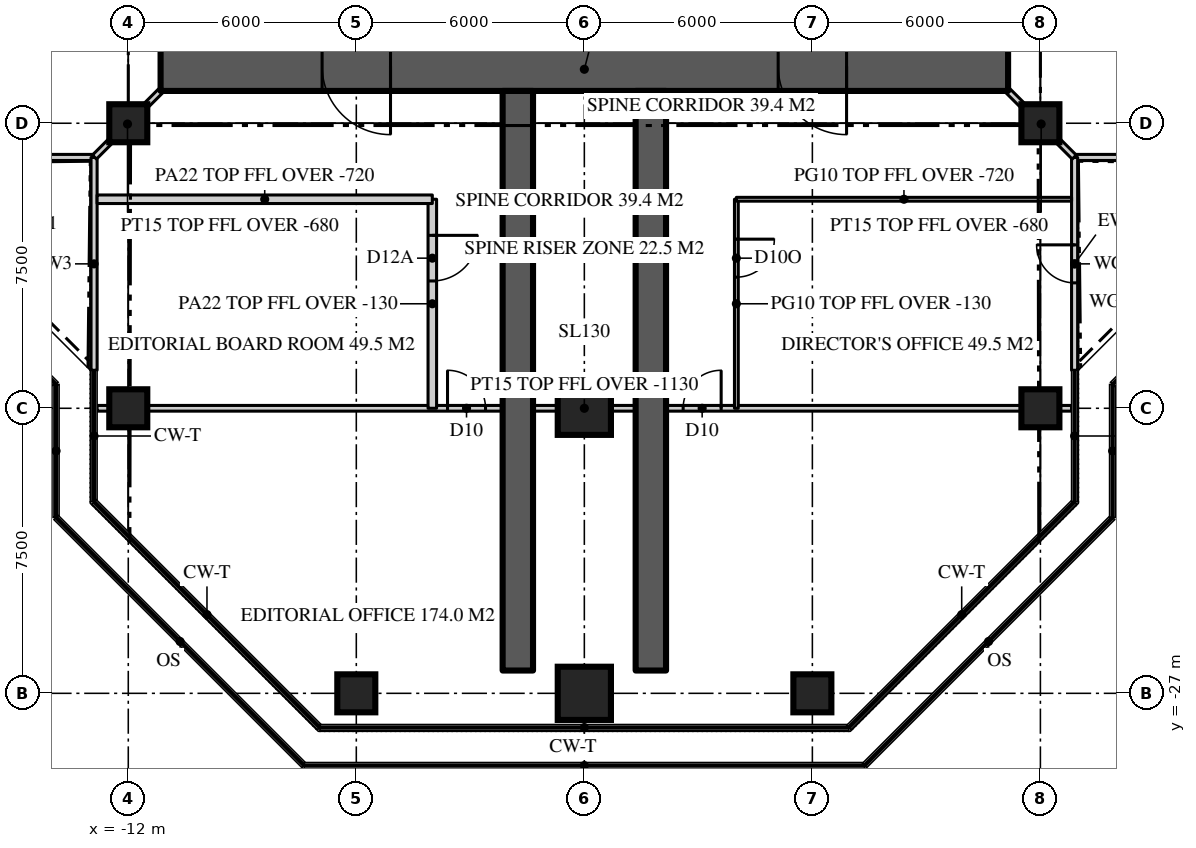
"""IFC4 building model, lengths in metres.
Left out: names, types, materials, properties, quantities, classifications, styles, units other than length and angle.
Written with IfcOpenShell. Run it as: python <this file> out.ifc"""

import sys

from ifc_helpers import new_model, si_unit, direction, frame, frame_2d, origin, origin_2d, place, context, subcontext, project, spatial, rectangle, extrude, element, fill, save


model = new_model("IFC4")
c1 = context("Model", 3, precision=1e-05, world=origin(), true_north=direction((0.0, 1.0)))
c2 = subcontext(c1, "Body", "Model", "MODEL_VIEW")
j1 = project(units=[si_unit("LENGTHUNIT", "METRE"), si_unit("PLANEANGLEUNIT", "RADIAN")], contexts=[c1])
p1 = place(None, origin())
s1 = spatial("IfcSite", under=j1, at=p1, CompositionType="ELEMENT")
p2 = place(p1, origin())
s2 = spatial("IfcBuilding", under=s1, at=p2, CompositionType="ELEMENT")
p3 = place(p2, frame((0.0, 0.0, 286.8)))
s3 = spatial("IfcBuildingStorey", under=s2, at=p3, CompositionType="ELEMENT", Elevation=286.8)
p4 = place(p3, frame((11.15, -10.5, 0.0), z_axis=(0.0, 0.0, 1.0), x_axis=(-1.0, 0.0, 0.0)))
e1 = element("IfcWall", 1, at=p4, inside=s3, PredefinedType="SHEAR", context=c2, shape_type="SweptSolid", body=[
    extrude(rectangle(XDim=22.3, YDim=1.3, at=frame_2d((11.15, 0.0))), origin(), (0.0, 0.0, 1.0), 3.9),
])
p5 = place(p4, frame((16.25, 0.0, 0.0)))
e2 = element("IfcOpeningElement", 2, at=p5, cuts=e1, PredefinedType="OPENING", context=c2, shape_type="SweptSolid", body=[
    extrude(rectangle(XDim=1.8, YDim=2.2, at=frame_2d((0.9, 1.1))), frame((0.0, 0.66, 0.0), z_axis=(0.0, -1.0, 0.0), x_axis=(1.0, 0.0, 0.0)), (0.0, 0.0, 1.0), 1.32),
])
p6 = place(p4, frame((4.25, 0.0, 0.0)))
e3 = element("IfcOpeningElement", 3, at=p6, cuts=e1, PredefinedType="OPENING", context=c2, shape_type="SweptSolid", body=[
    extrude(rectangle(XDim=1.8, YDim=2.2, at=frame_2d((0.9, 1.1))), frame((0.0, 0.66, 0.0), z_axis=(0.0, -1.0, 0.0), x_axis=(1.0, 0.0, 0.0)), (0.0, 0.0, 1.0), 1.32),
])
for number, where, z_axis, x_axis in (
    (4, (-1.75, -11.15, 0.0), (0.0, 0.0, 1.0), (0.0, -1.0, 0.0)),
    (5, (1.75, -11.15, 0.0), (0.0, 0.0, 1.0), (0.0, -1.0, 0.0)),
):
    element("IfcWall", number, at=place(p3, frame(where, z_axis=z_axis, x_axis=x_axis)), inside=s3, PredefinedType="SHEAR", context=c2, shape_type="SweptSolid", body=[
        extrude(rectangle(XDim=15.25, YDim=0.8, at=frame_2d((7.625, 0.0))), origin(), (0.0, 0.0, 1.0), 3.9),
    ])
p7 = place(p3, frame((-6.0, -27.0, 0.0), z_axis=(0.0, 0.0, 1.0), x_axis=(1.0, 0.0, 0.0)))
e6 = element("IfcColumn", 6, at=p7, inside=s3, PredefinedType="COLUMN", context=c2, shape_type="SweptSolid", body=[
    extrude(rectangle(XDim=1.0, YDim=1.0, at=origin_2d()), origin(), (0.0, 0.0, 1.0), 3.9),
])
p8 = place(p3, frame((0.0, -27.0, 0.0), z_axis=(0.0, 0.0, 1.0), x_axis=(1.0, 0.0, 0.0)))
e7 = element("IfcColumn", 7, at=p8, inside=s3, PredefinedType="COLUMN", context=c2, shape_type="SweptSolid", body=[
    extrude(rectangle(XDim=1.4, YDim=1.4, at=origin_2d()), origin(), (0.0, 0.0, 1.0), 3.9),
])
for number, where, z_axis, x_axis in (
    (8, (6.0, -27.0, 0.0), (0.0, 0.0, 1.0), (1.0, 0.0, 0.0)),
    (9, (-12.0, -19.5, 0.0), (0.0, 0.0, 1.0), (1.0, 0.0, 0.0)),
):
    element("IfcColumn", number, at=place(p3, frame(where, z_axis=z_axis, x_axis=x_axis)), inside=s3, PredefinedType="COLUMN", context=c2, shape_type="SweptSolid", body=[
        extrude(rectangle(XDim=1.0, YDim=1.0, at=origin_2d()), origin(), (0.0, 0.0, 1.0), 3.9),
    ])
p9 = place(p3, frame((0.0, -19.5, 0.0), z_axis=(0.0, 0.0, 1.0), x_axis=(1.0, 0.0, 0.0)))
e10 = element("IfcColumn", 10, at=p9, inside=s3, PredefinedType="COLUMN", context=c2, shape_type="SweptSolid", body=[
    extrude(rectangle(XDim=1.4, YDim=1.4, at=origin_2d()), origin(), (0.0, 0.0, 1.0), 3.9),
])
for number, where, z_axis, x_axis in (
    (11, (12.0, -19.5, 0.0), (0.0, 0.0, 1.0), (1.0, 0.0, 0.0)),
    (12, (-12.0, -12.0, 0.0), (0.0, 0.0, 1.0), (1.0, 0.0, 0.0)),
    (13, (12.0, -12.0, 0.0), (0.0, 0.0, 1.0), (1.0, 0.0, 0.0)),
):
    element("IfcColumn", number, at=place(p3, frame(where, z_axis=z_axis, x_axis=x_axis)), inside=s3, PredefinedType="COLUMN", context=c2, shape_type="SweptSolid", body=[
        extrude(rectangle(XDim=1.0, YDim=1.0, at=origin_2d()), origin(), (0.0, 0.0, 1.0), 3.9),
    ])
p10 = place(p3, frame((12.9, -12.9, 0.0), z_axis=(0.0, 0.0, 1.0), x_axis=(1.0, 0.0, 0.0)))
e14 = element("IfcWall", 14, at=p10, inside=s3, PredefinedType="SOLIDWALL", context=c2, shape_type="SweptSolid", body=[
    extrude(rectangle(XDim=5.6, YDim=0.16, at=frame_2d((2.8, 0.0))), origin(), (0.0, 0.0, 1.0), 3.77),
])
p11 = place(p3, frame((-18.5, -12.9, 0.0), z_axis=(0.0, 0.0, 1.0), x_axis=(1.0, 0.0, 0.0)))
e15 = element("IfcWall", 15, at=p11, inside=s3, PredefinedType="SOLIDWALL", context=c2, shape_type="SweptSolid", body=[
    extrude(rectangle(XDim=5.6, YDim=0.16, at=frame_2d((2.8, 0.0))), origin(), (0.0, 0.0, 1.0), 3.77),
])
p12 = place(p11, frame((2.3, 0.0, 0.0)))
e16 = element("IfcOpeningElement", 16, at=p12, cuts=e15, PredefinedType="OPENING", context=c2, shape_type="SweptSolid", body=[
    extrude(rectangle(XDim=1.0, YDim=2.2, at=frame_2d((0.5, 1.1))), frame((0.0, 0.09, 0.0), z_axis=(0.0, -1.0, 0.0), x_axis=(1.0, 0.0, 0.0)), (0.0, 0.0, 1.0), 0.18),
])
p13 = place(p3, frame((-12.9, -12.9, 0.0), z_axis=(0.0, 0.0, 1.0), x_axis=(0.0, -1.0, 0.0)))
e17 = element("IfcWall", 17, at=p13, inside=s3, PredefinedType="SOLIDWALL", context=c2, shape_type="SweptSolid", body=[
    extrude(rectangle(XDim=5.6, YDim=0.16, at=frame_2d((2.8, 0.0))), origin(), (0.0, 0.0, 1.0), 3.77),
])
p14 = place(p3, frame((12.9, -18.5, 0.0), z_axis=(0.0, 0.0, 1.0), x_axis=(0.0, 1.0, 0.0)))
e18 = element("IfcWall", 18, at=p14, inside=s3, PredefinedType="SOLIDWALL", context=c2, shape_type="SweptSolid", body=[
    extrude(rectangle(XDim=5.6, YDim=0.16, at=frame_2d((2.8, 0.0))), origin(), (0.0, 0.0, 1.0), 3.77),
])
p15 = place(p14, frame((2.3, 0.0, 0.0)))
e19 = element("IfcOpeningElement", 19, at=p15, cuts=e18, PredefinedType="OPENING", context=c2, shape_type="SweptSolid", body=[
    extrude(rectangle(XDim=1.0, YDim=2.2, at=frame_2d((0.5, 1.1))), frame((0.0, 0.09, 0.0), z_axis=(0.0, -1.0, 0.0), x_axis=(1.0, 0.0, 0.0)), (0.0, 0.0, 1.0), 0.18),
])
p16 = place(p3, frame((-12.82, -19.5, 0.0), z_axis=(0.0, 0.0, 1.0), x_axis=(1.0, 0.0, 0.0)))
e20 = element("IfcWall", 20, at=p16, inside=s3, PredefinedType="PARTITIONING", context=c2, shape_type="SweptSolid", body=[
    extrude(rectangle(XDim=25.64, YDim=0.15, at=frame_2d((12.82, 0.0))), origin(), (0.0, 0.0, 1.0), 2.77),
])
p17 = place(p16, frame((15.42, 0.0, 0.0)))
e21 = element("IfcOpeningElement", 21, at=p17, cuts=e20, PredefinedType="OPENING", context=c2, shape_type="SweptSolid", body=[
    extrude(rectangle(XDim=1.0, YDim=2.2, at=frame_2d((0.5, 1.1))), frame((0.0, 0.085, 0.0), z_axis=(0.0, -1.0, 0.0), x_axis=(1.0, 0.0, 0.0)), (0.0, 0.0, 1.0), 0.17),
])
p18 = place(p16, frame((9.22, 0.0, 0.0)))
e22 = element("IfcOpeningElement", 22, at=p18, cuts=e20, PredefinedType="OPENING", context=c2, shape_type="SweptSolid", body=[
    extrude(rectangle(XDim=1.0, YDim=2.2, at=frame_2d((0.5, 1.1))), frame((0.0, 0.085, 0.0), z_axis=(0.0, -1.0, 0.0), x_axis=(1.0, 0.0, 0.0)), (0.0, 0.0, 1.0), 0.17),
])
p19 = place(p3, frame((4.0, -14.0, 0.0), z_axis=(0.0, 0.0, 1.0), x_axis=(0.0, -1.0, 0.0)))
e23 = element("IfcWall", 23, at=p19, inside=s3, PredefinedType="PARTITIONING", context=c2, shape_type="SweptSolid", body=[
    extrude(rectangle(XDim=5.5, YDim=0.1, at=frame_2d((2.75, 0.0))), origin(), (0.0, 0.0, 1.0), 3.77),
])
p20 = place(p19, frame((1.05, 0.0, 0.0)))
e24 = element("IfcOpeningElement", 24, at=p20, cuts=e23, PredefinedType="OPENING", context=c2, shape_type="SweptSolid", body=[
    extrude(rectangle(XDim=1.0, YDim=2.2, at=frame_2d((0.5, 1.1))), frame((0.0, 0.06, 0.0), z_axis=(0.0, -1.0, 0.0), x_axis=(1.0, 0.0, 0.0)), (0.0, 0.0, 1.0), 0.12),
])
p21 = place(p3, frame((4.0, -14.0, 0.0), z_axis=(0.0, 0.0, 1.0), x_axis=(1.0, 0.0, 0.0)))
e25 = element("IfcWall", 25, at=p21, inside=s3, PredefinedType="PARTITIONING", context=c2, shape_type="SweptSolid", body=[
    extrude(rectangle(XDim=8.82, YDim=0.1, at=frame_2d((4.41, 0.0))), origin(), (0.0, 0.0, 1.0), 3.18),
])
p22 = place(p3, frame((-4.0, -14.0, 0.0), z_axis=(0.0, 0.0, 1.0), x_axis=(0.0, -1.0, 0.0)))
e26 = element("IfcWall", 26, at=p22, inside=s3, PredefinedType="PARTITIONING", context=c2, shape_type="SweptSolid", body=[
    extrude(rectangle(XDim=5.5, YDim=0.225, at=frame_2d((2.75, 0.0))), origin(), (0.0, 0.0, 1.0), 3.77),
])
p23 = place(p22, frame((0.95, 0.0, 0.0)))
e27 = element("IfcOpeningElement", 27, at=p23, cuts=e26, PredefinedType="OPENING", context=c2, shape_type="SweptSolid", body=[
    extrude(rectangle(XDim=1.2, YDim=2.2, at=frame_2d((0.6, 1.1))), frame((0.0, 0.123, 0.0), z_axis=(0.0, -1.0, 0.0), x_axis=(1.0, 0.0, 0.0)), (0.0, 0.0, 1.0), 0.245),
])
p24 = place(p3, frame((-4.0, -14.0, 0.0), z_axis=(0.0, 0.0, 1.0), x_axis=(-1.0, 0.0, 0.0)))
e28 = element("IfcWall", 28, at=p24, inside=s3, PredefinedType="PARTITIONING", context=c2, shape_type="SweptSolid", body=[
    extrude(rectangle(XDim=8.82, YDim=0.225, at=frame_2d((4.41, 0.0))), origin(), (0.0, 0.0, 1.0), 3.18),
])
for number, where, z_axis, x_axis in (
    (29, (-11.15, -11.15, 0.0), (0.0, 0.0, 1.0), (-0.707, -0.707, 0.0)),
    (30, (11.15, -11.15, 0.0), (0.0, 0.0, 1.0), (0.707, -0.707, 0.0)),
):
    element("IfcWall", number, at=place(p3, frame(where, z_axis=z_axis, x_axis=x_axis)), inside=s3, PredefinedType="PARTITIONING", context=c2, shape_type="SweptSolid", body=[
        extrude(rectangle(XDim=2.461, YDim=0.15, at=frame_2d((1.23, 0.0))), origin(), (0.0, 0.0, 1.0), 3.22),
    ])
p25 = place(p15, origin())
e31 = element("IfcDoor", 31, at=p25, inside=s3, OperationType="SINGLE_SWING_RIGHT", PredefinedType="DOOR", context=c2, shape_type="SweptSolid", body=[
    extrude(rectangle(XDim=1.0, YDim=2.2, at=frame_2d((0.5, 1.1))), frame((0.0, 0.025, 0.0), z_axis=(0.0, -1.0, 0.0), x_axis=(1.0, 0.0, 0.0)), (0.0, 0.0, 1.0), 0.05),
])
fill(e19, e31)
p26 = place(p5, origin())
e32 = element("IfcDoor", 32, at=p26, inside=s3, OperationType="DOUBLE_DOOR_DOUBLE_SWING", PredefinedType="DOOR", context=c2, shape_type="SweptSolid", body=[
    extrude(rectangle(XDim=1.8, YDim=2.2, at=frame_2d((0.9, 1.1))), frame((0.0, 0.025, 0.0), z_axis=(0.0, -1.0, 0.0), x_axis=(1.0, 0.0, 0.0)), (0.0, 0.0, 1.0), 0.05),
])
fill(e2, e32)
p27 = place(p6, origin())
e33 = element("IfcDoor", 33, at=p27, inside=s3, OperationType="DOUBLE_DOOR_DOUBLE_SWING", PredefinedType="DOOR", context=c2, shape_type="SweptSolid", body=[
    extrude(rectangle(XDim=1.8, YDim=2.2, at=frame_2d((0.9, 1.1))), frame((0.0, 0.025, 0.0), z_axis=(0.0, -1.0, 0.0), x_axis=(1.0, 0.0, 0.0)), (0.0, 0.0, 1.0), 0.05),
])
fill(e3, e33)
p28 = place(p17, origin())
e34 = element("IfcDoor", 34, at=p28, inside=s3, OperationType="SINGLE_SWING_RIGHT", PredefinedType="DOOR", context=c2, shape_type="SweptSolid", body=[
    extrude(rectangle(XDim=1.0, YDim=2.2, at=frame_2d((0.5, 1.1))), frame((0.0, 0.025, 0.0), z_axis=(0.0, -1.0, 0.0), x_axis=(1.0, 0.0, 0.0)), (0.0, 0.0, 1.0), 0.05),
])
fill(e21, e34)
p29 = place(p18, origin())
e35 = element("IfcDoor", 35, at=p29, inside=s3, OperationType="SINGLE_SWING_LEFT", PredefinedType="DOOR", context=c2, shape_type="SweptSolid", body=[
    extrude(rectangle(XDim=1.0, YDim=2.2, at=frame_2d((0.5, 1.1))), frame((0.0, 0.025, 0.0), z_axis=(0.0, -1.0, 0.0), x_axis=(1.0, 0.0, 0.0)), (0.0, 0.0, 1.0), 0.05),
])
fill(e22, e35)
p30 = place(p20, origin())
e36 = element("IfcDoor", 36, at=p30, inside=s3, OperationType="SINGLE_SWING_LEFT", PredefinedType="DOOR", context=c2, shape_type="SweptSolid", body=[
    extrude(rectangle(XDim=1.0, YDim=2.2, at=frame_2d((0.5, 1.1))), frame((0.0, 0.025, 0.0), z_axis=(0.0, -1.0, 0.0), x_axis=(1.0, 0.0, 0.0)), (0.0, 0.0, 1.0), 0.05),
])
fill(e24, e36)
p31 = place(p23, origin())
e37 = element("IfcDoor", 37, at=p31, inside=s3, OperationType="SINGLE_SWING_LEFT", PredefinedType="DOOR", context=c2, shape_type="SweptSolid", body=[
    extrude(rectangle(XDim=1.2, YDim=2.2, at=frame_2d((0.6, 1.1))), frame((0.0, 0.025, 0.0), z_axis=(0.0, -1.0, 0.0), x_axis=(1.0, 0.0, 0.0)), (0.0, 0.0, 1.0), 0.05),
])
fill(e27, e37)
save(model, sys.argv[1])
